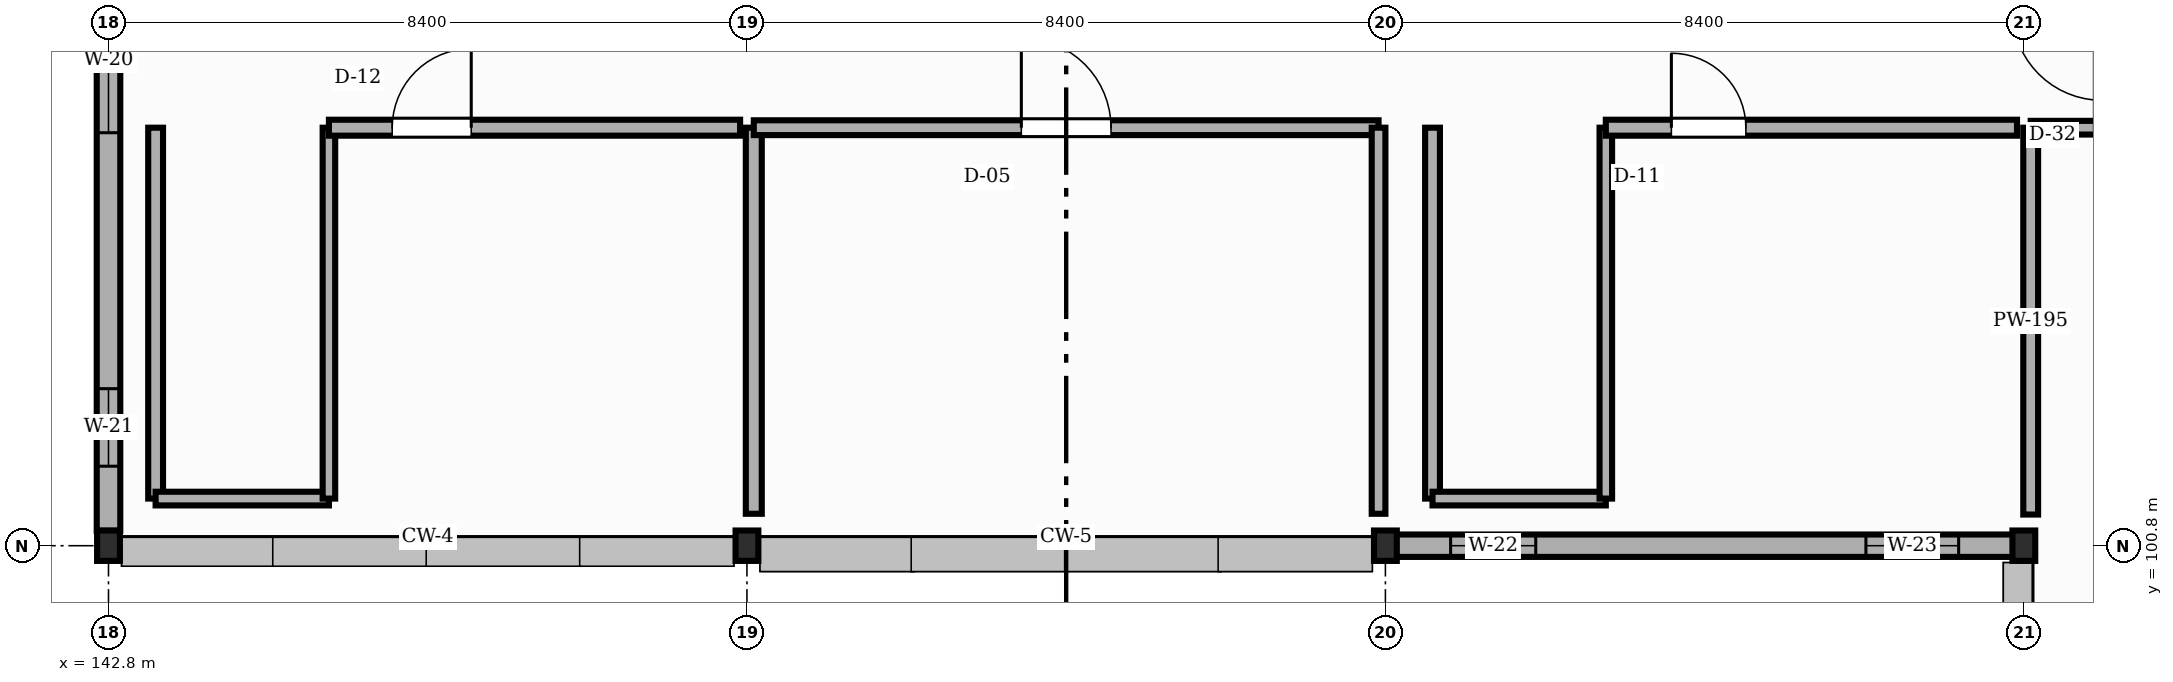
"""IFC4 building model, lengths in metres.
Left out: names, types, materials, properties, quantities, classifications, styles, units other than length and angle.
Written with IfcOpenShell. Run it as: python <this file> out.ifc"""

import sys

from ifc_helpers import new_model, si_unit, direction, frame, frame_2d, origin, origin_2d, place, context, subcontext, project, spatial, rectangle, i_section, extrude, element, fill, save


model = new_model("IFC4")
c1 = context("Model", 3, precision=1e-05, world=origin(), true_north=direction((0.0, 1.0)))
c2 = subcontext(c1, "Body", "Model", "MODEL_VIEW")
j1 = project(units=[si_unit("LENGTHUNIT", "METRE"), si_unit("PLANEANGLEUNIT", "RADIAN")], contexts=[c1])
p1 = place(None, origin())
s1 = spatial("IfcSite", under=j1, at=p1, CompositionType="ELEMENT")
p2 = place(p1, origin())
s2 = spatial("IfcBuilding", under=s1, at=p2, CompositionType="ELEMENT")
p3 = place(p2, frame((0.0, 0.0, 22.05)))
s3 = spatial("IfcBuildingStorey", under=s2, at=p3, CompositionType="ELEMENT", Elevation=22.05)
for number, where, z_axis, x_axis in (
    (1, (142.8, 100.8, 0.0), (0.0, 0.0, 1.0), (1.0, 0.0, 0.0)),
    (2, (151.2, 100.8, 0.0), (0.0, 0.0, 1.0), (1.0, 0.0, 0.0)),
    (3, (159.6, 100.8, 0.0), (0.0, 0.0, 1.0), (1.0, 0.0, 0.0)),
    (4, (168.0, 100.8, 0.0), (0.0, 0.0, 1.0), (1.0, 0.0, 0.0)),
):
    element("IfcColumn", number, at=place(p3, frame(where, z_axis=z_axis, x_axis=x_axis)), inside=s3, PredefinedType="COLUMN", context=c2, shape_type="SweptSolid", body=[
        extrude(i_section(OverallWidth=0.3, OverallDepth=0.4, WebThickness=0.013, FlangeThickness=0.024, FilletRadius=0.027, at=origin_2d()), origin(), (0.0, 0.0, 1.0), 4.05),
    ])
p4 = place(p3, frame((142.8, 109.004, 0.0), z_axis=(0.0, 0.0, 1.0), x_axis=(0.0, -1.0, 0.0)))
e5 = element("IfcWall", 5, at=p4, inside=s3, PredefinedType="STANDARD", context=c2, shape_type="SweptSolid", body=[
    extrude(rectangle(XDim=8.008, YDim=0.31, at=frame_2d((4.004, 0.0))), origin(), (0.0, 0.0, 1.0), 3.587),
])
p5 = place(p4, frame((0.85, 0.0, 0.9)))
e6 = element("IfcOpeningElement", 6, at=p5, cuts=e5, PredefinedType="OPENING", context=c2, shape_type="SweptSolid", body=[
    extrude(rectangle(XDim=1.92, YDim=1.25, at=frame_2d((0.96, 0.625))), frame((0.0, 0.165, 0.0), z_axis=(0.0, -1.0, 0.0), x_axis=(1.0, 0.0, 0.0)), (0.0, 0.0, 1.0), 0.33),
])
p6 = place(p4, frame((6.138, 0.0, 0.9)))
e7 = element("IfcOpeningElement", 7, at=p6, cuts=e5, PredefinedType="OPENING", context=c2, shape_type="SweptSolid", body=[
    extrude(rectangle(XDim=1.02, YDim=1.45, at=frame_2d((0.51, 0.725))), frame((0.0, 0.165, 0.0), z_axis=(0.0, -1.0, 0.0), x_axis=(1.0, 0.0, 0.0)), (0.0, 0.0, 1.0), 0.33),
])
p7 = place(p3, frame((159.608, 100.8, 0.0), z_axis=(0.0, 0.0, 1.0), x_axis=(1.0, 0.0, 0.0)))
e8 = element("IfcWall", 8, at=p7, inside=s3, PredefinedType="STANDARD", context=c2, shape_type="SweptSolid", body=[
    extrude(rectangle(XDim=8.384, YDim=0.295, at=frame_2d((4.192, 0.0))), origin(), (0.0, 0.0, 1.0), 3.527),
])
p8 = place(p7, frame((0.85, 0.0, 0.9)))
e9 = element("IfcOpeningElement", 9, at=p8, cuts=e8, PredefinedType="OPENING", context=c2, shape_type="SweptSolid", body=[
    extrude(rectangle(XDim=1.12, YDim=1.45, at=frame_2d((0.56, 0.725))), frame((0.0, 0.157, 0.0), z_axis=(0.0, -1.0, 0.0), x_axis=(1.0, 0.0, 0.0)), (0.0, 0.0, 1.0), 0.315),
])
p9 = place(p7, frame((6.314, 0.0, 0.9)))
e10 = element("IfcOpeningElement", 10, at=p9, cuts=e8, PredefinedType="OPENING", context=c2, shape_type="SweptSolid", body=[
    extrude(rectangle(XDim=1.22, YDim=1.45, at=frame_2d((0.61, 0.725))), frame((0.0, 0.157, 0.0), z_axis=(0.0, -1.0, 0.0), x_axis=(1.0, 0.0, 0.0)), (0.0, 0.0, 1.0), 0.315),
])
p10 = place(p3, frame((168.09, 101.21, -0.004), z_axis=(0.0, 0.0, 1.0), x_axis=(0.0, 1.0, 0.0)))
e11 = element("IfcWall", 11, at=p10, inside=s3, PredefinedType="STANDARD", context=c2, shape_type="SweptSolid", body=[
    extrude(rectangle(XDim=5.09, YDim=0.195, at=frame_2d((2.545, 0.0))), origin(), (0.0, 0.0, 1.0), 3.551),
])
p11 = place(p3, frame((168.09, 106.3, -0.004), z_axis=(0.0, 0.0, 1.0), x_axis=(1.0, 0.0, 0.0)))
e12 = element("IfcWall", 12, at=p11, inside=s3, PredefinedType="STANDARD", context=c2, shape_type="SweptSolid", body=[
    extrude(rectangle(XDim=0.94, YDim=0.18, at=frame_2d((0.47, 0.0))), origin(), (0.0, 0.0, 1.0), 3.854),
])
p12 = place(p3, frame((151.29, 101.22, -0.004), z_axis=(0.0, 0.0, 1.0), x_axis=(0.0, 1.0, 0.0)))
e13 = element("IfcWall", 13, at=p12, inside=s3, PredefinedType="STANDARD", context=c2, shape_type="SweptSolid", body=[
    extrude(rectangle(XDim=5.08, YDim=0.21, at=frame_2d((2.54, 0.0))), origin(), (0.0, 0.0, 1.0), 3.461),
])
p13 = place(p3, frame((151.29, 106.3, -0.004), z_axis=(0.0, 0.0, 1.0), x_axis=(1.0, 0.0, 0.0)))
e14 = element("IfcWall", 14, at=p13, inside=s3, PredefinedType="STANDARD", context=c2, shape_type="SweptSolid", body=[
    extrude(rectangle(XDim=8.22, YDim=0.195, at=frame_2d((4.11, 0.0))), origin(), (0.0, 0.0, 1.0), 3.854),
])
p14 = place(p13, frame((3.52, 0.0, 0.0)))
e15 = element("IfcOpeningElement", 15, at=p14, cuts=e14, PredefinedType="OPENING", context=c2, shape_type="SweptSolid", body=[
    extrude(rectangle(XDim=1.18, YDim=2.06, at=frame_2d((0.59, 1.03))), frame((0.0, 0.107, 0.0), z_axis=(0.0, -1.0, 0.0), x_axis=(1.0, 0.0, 0.0)), (0.0, 0.0, 1.0), 0.215),
])
p15 = place(p3, frame((159.51, 106.3, -0.004), z_axis=(0.0, 0.0, 1.0), x_axis=(0.0, -1.0, 0.0)))
e16 = element("IfcWall", 16, at=p15, inside=s3, PredefinedType="STANDARD", context=c2, shape_type="SweptSolid", body=[
    extrude(rectangle(XDim=5.08, YDim=0.18, at=frame_2d((2.54, 0.0))), origin(), (0.0, 0.0, 1.0), 3.511),
])
p16 = place(p3, frame((160.22, 106.3, -0.004), z_axis=(0.0, 0.0, 1.0), x_axis=(0.0, -1.0, 0.0)))
e17 = element("IfcWall", 17, at=p16, inside=s3, PredefinedType="STANDARD", context=c2, shape_type="SweptSolid", body=[
    extrude(rectangle(XDim=4.88, YDim=0.195, at=frame_2d((2.44, 0.0))), origin(), (0.0, 0.0, 1.0), 3.854),
])
p17 = place(p3, frame((160.22, 101.42, -0.004), z_axis=(0.0, 0.0, 1.0), x_axis=(1.0, 0.0, 0.0)))
e18 = element("IfcWall", 18, at=p17, inside=s3, PredefinedType="STANDARD", context=c2, shape_type="SweptSolid", body=[
    extrude(rectangle(XDim=2.28, YDim=0.18, at=frame_2d((1.14, 0.0))), origin(), (0.0, 0.0, 1.0), 3.854),
])
p18 = place(p3, frame((162.5, 101.42, -0.004), z_axis=(0.0, 0.0, 1.0), x_axis=(0.0, 1.0, 0.0)))
e19 = element("IfcWall", 19, at=p18, inside=s3, PredefinedType="STANDARD", context=c2, shape_type="SweptSolid", body=[
    extrude(rectangle(XDim=4.88, YDim=0.165, at=frame_2d((2.44, 0.0))), origin(), (0.0, 0.0, 1.0), 3.621),
])
p19 = place(p3, frame((162.5, 106.3, -0.004), z_axis=(0.0, 0.0, 1.0), x_axis=(1.0, 0.0, 0.0)))
e20 = element("IfcWall", 20, at=p19, inside=s3, PredefinedType="STANDARD", context=c2, shape_type="SweptSolid", body=[
    extrude(rectangle(XDim=5.41, YDim=0.21, at=frame_2d((2.705, 0.0))), origin(), (0.0, 0.0, 1.0), 3.854),
])
p20 = place(p19, frame((0.863, 0.0, 0.0)))
e21 = element("IfcOpeningElement", 21, at=p20, cuts=e20, PredefinedType="OPENING", context=c2, shape_type="SweptSolid", body=[
    extrude(rectangle(XDim=0.98, YDim=2.14, at=frame_2d((0.49, 1.07))), frame((0.0, 0.115, 0.0), z_axis=(0.0, -1.0, 0.0), x_axis=(1.0, 0.0, 0.0)), (0.0, 0.0, 1.0), 0.23),
])
p21 = place(p3, frame((143.42, 106.3, -0.004), z_axis=(0.0, 0.0, 1.0), x_axis=(0.0, -1.0, 0.0)))
e22 = element("IfcWall", 22, at=p21, inside=s3, PredefinedType="STANDARD", context=c2, shape_type="SweptSolid", body=[
    extrude(rectangle(XDim=4.88, YDim=0.195, at=frame_2d((2.44, 0.0))), origin(), (0.0, 0.0, 1.0), 3.854),
])
p22 = place(p3, frame((143.42, 101.42, -0.004), z_axis=(0.0, 0.0, 1.0), x_axis=(1.0, 0.0, 0.0)))
e23 = element("IfcWall", 23, at=p22, inside=s3, PredefinedType="STANDARD", context=c2, shape_type="SweptSolid", body=[
    extrude(rectangle(XDim=2.28, YDim=0.18, at=frame_2d((1.14, 0.0))), origin(), (0.0, 0.0, 1.0), 3.854),
])
p23 = place(p3, frame((145.7, 101.42, -0.004), z_axis=(0.0, 0.0, 1.0), x_axis=(0.0, 1.0, 0.0)))
e24 = element("IfcWall", 24, at=p23, inside=s3, PredefinedType="STANDARD", context=c2, shape_type="SweptSolid", body=[
    extrude(rectangle(XDim=4.88, YDim=0.165, at=frame_2d((2.44, 0.0))), origin(), (0.0, 0.0, 1.0), 3.561),
])
p24 = place(p3, frame((145.7, 106.3, -0.004), z_axis=(0.0, 0.0, 1.0), x_axis=(1.0, 0.0, 0.0)))
e25 = element("IfcWall", 25, at=p24, inside=s3, PredefinedType="STANDARD", context=c2, shape_type="SweptSolid", body=[
    extrude(rectangle(XDim=5.41, YDim=0.21, at=frame_2d((2.705, 0.0))), origin(), (0.0, 0.0, 1.0), 3.854),
])
p25 = place(p24, frame((0.833, 0.0, 0.0)))
e26 = element("IfcOpeningElement", 26, at=p25, cuts=e25, PredefinedType="OPENING", context=c2, shape_type="SweptSolid", body=[
    extrude(rectangle(XDim=1.04, YDim=2.14, at=frame_2d((0.52, 1.07))), frame((0.0, 0.115, 0.0), z_axis=(0.0, -1.0, 0.0), x_axis=(1.0, 0.0, 0.0)), (0.0, 0.0, 1.0), 0.23),
])
p26 = place(p5, origin())
e27 = element("IfcWindow", 27, at=p26, inside=s3, PartitioningType="SINGLE_PANEL", PredefinedType="WINDOW", context=c2, shape_type="SweptSolid", body=[
    extrude(rectangle(XDim=1.92, YDim=1.25, at=frame_2d((0.96, 0.625))), frame((0.0, 0.03, 0.0), z_axis=(0.0, -1.0, 0.0), x_axis=(1.0, 0.0, 0.0)), (0.0, 0.0, 1.0), 0.06),
])
fill(e6, e27)
p27 = place(p6, origin())
e28 = element("IfcWindow", 28, at=p27, inside=s3, PartitioningType="SINGLE_PANEL", PredefinedType="WINDOW", context=c2, shape_type="SweptSolid", body=[
    extrude(rectangle(XDim=1.02, YDim=1.45, at=frame_2d((0.51, 0.725))), frame((0.0, 0.03, 0.0), z_axis=(0.0, -1.0, 0.0), x_axis=(1.0, 0.0, 0.0)), (0.0, 0.0, 1.0), 0.06),
])
fill(e7, e28)
p28 = place(p8, origin())
e29 = element("IfcWindow", 29, at=p28, inside=s3, PartitioningType="SINGLE_PANEL", PredefinedType="WINDOW", context=c2, shape_type="SweptSolid", body=[
    extrude(rectangle(XDim=1.12, YDim=1.45, at=frame_2d((0.56, 0.725))), frame((0.0, 0.03, 0.0), z_axis=(0.0, -1.0, 0.0), x_axis=(1.0, 0.0, 0.0)), (0.0, 0.0, 1.0), 0.06),
])
fill(e9, e29)
p29 = place(p9, origin())
e30 = element("IfcWindow", 30, at=p29, inside=s3, PartitioningType="SINGLE_PANEL", PredefinedType="WINDOW", context=c2, shape_type="SweptSolid", body=[
    extrude(rectangle(XDim=1.22, YDim=1.45, at=frame_2d((0.61, 0.725))), frame((0.0, 0.03, 0.0), z_axis=(0.0, -1.0, 0.0), x_axis=(1.0, 0.0, 0.0)), (0.0, 0.0, 1.0), 0.06),
])
fill(e10, e30)
p30 = place(p14, origin())
e31 = element("IfcDoor", 31, at=p30, inside=s3, OperationType="SINGLE_SWING_LEFT", PredefinedType="DOOR", context=c2, shape_type="SweptSolid", body=[
    extrude(rectangle(XDim=1.18, YDim=2.06, at=frame_2d((0.59, 1.03))), frame((0.0, 0.025, 0.0), z_axis=(0.0, -1.0, 0.0), x_axis=(1.0, 0.0, 0.0)), (0.0, 0.0, 1.0), 0.05),
])
fill(e15, e31)
p31 = place(p20, origin())
e32 = element("IfcDoor", 32, at=p31, inside=s3, OperationType="SINGLE_SWING_LEFT", PredefinedType="DOOR", context=c2, shape_type="SweptSolid", body=[
    extrude(rectangle(XDim=0.98, YDim=2.14, at=frame_2d((0.49, 1.07))), frame((0.0, 0.025, 0.0), z_axis=(0.0, -1.0, 0.0), x_axis=(1.0, 0.0, 0.0)), (0.0, 0.0, 1.0), 0.05),
])
fill(e21, e32)
p32 = place(p25, origin())
e33 = element("IfcDoor", 33, at=p32, inside=s3, OperationType="SINGLE_SWING_RIGHT", PredefinedType="DOOR", context=c2, shape_type="SweptSolid", body=[
    extrude(rectangle(XDim=1.04, YDim=2.14, at=frame_2d((0.52, 1.07))), frame((0.0, 0.025, 0.0), z_axis=(0.0, -1.0, 0.0), x_axis=(1.0, 0.0, 0.0)), (0.0, 0.0, 1.0), 0.05),
])
fill(e26, e33)
save(model, sys.argv[1])
